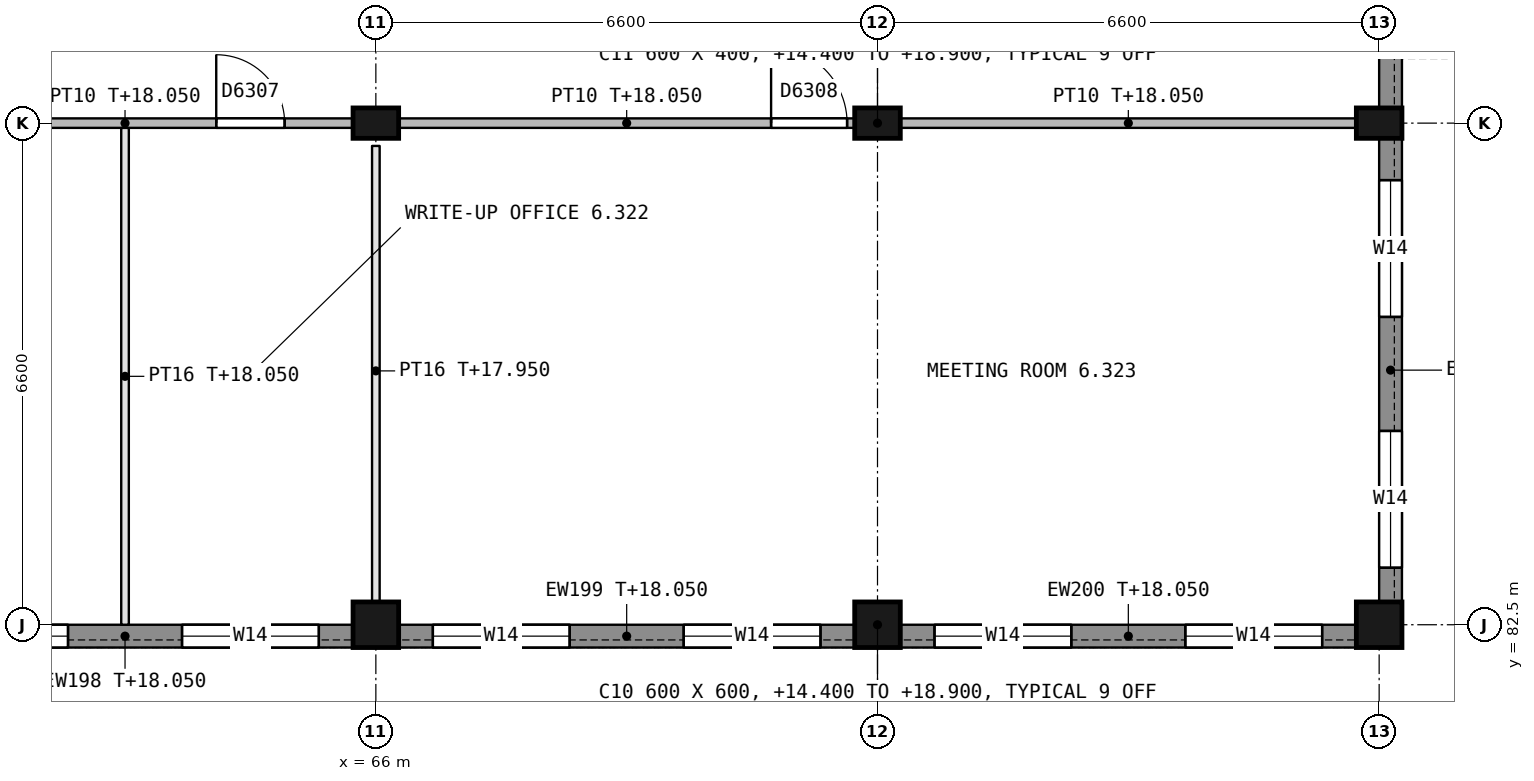
"""IFC4 building model, lengths in metres.
Left out: names, types, materials, properties, quantities, classifications, styles, units other than length and angle.
Written with IfcOpenShell. Run it as: python <this file> out.ifc"""

import sys

from ifc_helpers import new_model, si_unit, direction, frame, frame_2d, origin, origin_2d, place, context, subcontext, project, spatial, rectangle, extrude, element, fill, save


model = new_model("IFC4")
c1 = context("Model", 3, precision=1e-05, world=origin(), true_north=direction((0.0, 1.0)))
c2 = subcontext(c1, "Body", "Model", "MODEL_VIEW")
j1 = project(units=[si_unit("LENGTHUNIT", "METRE"), si_unit("PLANEANGLEUNIT", "RADIAN")], contexts=[c1])
p1 = place(None, origin())
s1 = spatial("IfcSite", under=j1, at=p1, CompositionType="ELEMENT")
p2 = place(p1, origin())
s2 = spatial("IfcBuilding", under=s1, at=p2, CompositionType="ELEMENT")
p3 = place(p2, frame((0.0, 0.0, 14.4)))
s3 = spatial("IfcBuildingStorey", under=s2, at=p3, CompositionType="ELEMENT", Elevation=14.4)
p4 = place(p3, frame((66.0, 82.5, 0.0), z_axis=(0.0, 0.0, 1.0), x_axis=(1.0, 0.0, 0.0)))
e1 = element("IfcColumn", 1, at=p4, inside=s3, PredefinedType="COLUMN", context=c2, shape_type="SweptSolid", body=[
    extrude(rectangle(XDim=0.6, YDim=0.6, at=origin_2d()), origin(), (0.0, 0.0, 1.0), 4.5),
])
p5 = place(p3, frame((66.0, 89.1, 0.0), z_axis=(0.0, 0.0, 1.0), x_axis=(1.0, 0.0, 0.0)))
e2 = element("IfcColumn", 2, at=p5, inside=s3, PredefinedType="COLUMN", context=c2, shape_type="SweptSolid", body=[
    extrude(rectangle(XDim=0.6, YDim=0.4, at=origin_2d()), origin(), (0.0, 0.0, 1.0), 4.5),
])
p6 = place(p3, frame((72.6, 82.5, 0.0), z_axis=(0.0, 0.0, 1.0), x_axis=(1.0, 0.0, 0.0)))
e3 = element("IfcColumn", 3, at=p6, inside=s3, PredefinedType="COLUMN", context=c2, shape_type="SweptSolid", body=[
    extrude(rectangle(XDim=0.6, YDim=0.6, at=origin_2d()), origin(), (0.0, 0.0, 1.0), 4.5),
])
p7 = place(p3, frame((72.6, 89.1, 0.0), z_axis=(0.0, 0.0, 1.0), x_axis=(1.0, 0.0, 0.0)))
e4 = element("IfcColumn", 4, at=p7, inside=s3, PredefinedType="COLUMN", context=c2, shape_type="SweptSolid", body=[
    extrude(rectangle(XDim=0.6, YDim=0.4, at=origin_2d()), origin(), (0.0, 0.0, 1.0), 4.5),
])
p8 = place(p3, frame((79.2, 82.5, 0.0), z_axis=(0.0, 0.0, 1.0), x_axis=(1.0, 0.0, 0.0)))
e5 = element("IfcColumn", 5, at=p8, inside=s3, PredefinedType="COLUMN", context=c2, shape_type="SweptSolid", body=[
    extrude(rectangle(XDim=0.6, YDim=0.6, at=origin_2d()), origin(), (0.0, 0.0, 1.0), 4.5),
])
p9 = place(p3, frame((79.2, 89.1, 0.0), z_axis=(0.0, 0.0, 1.0), x_axis=(1.0, 0.0, 0.0)))
e6 = element("IfcColumn", 6, at=p9, inside=s3, PredefinedType="COLUMN", context=c2, shape_type="SweptSolid", body=[
    extrude(rectangle(XDim=0.6, YDim=0.4, at=origin_2d()), origin(), (0.0, 0.0, 1.0), 4.5),
])
p10 = place(p3, frame((79.35, 88.9, 0.0), z_axis=(0.0, 0.0, 1.0), x_axis=(0.0, -1.0, 0.0)))
e7 = element("IfcWall", 7, at=p10, inside=s3, PredefinedType="STANDARD", context=c2, shape_type="SweptSolid", body=[
    extrude(rectangle(XDim=6.1, YDim=0.3, at=frame_2d((3.05, 0.0))), origin(), (0.0, 0.0, 1.0), 3.65),
])
p11 = place(p10, frame((3.85, 0.0, 0.9)))
e8 = element("IfcOpeningElement", 8, at=p11, cuts=e7, PredefinedType="OPENING", context=c2, shape_type="SweptSolid", body=[
    extrude(rectangle(XDim=1.8, YDim=1.5, at=frame_2d((0.9, 0.75))), frame((0.0, 0.16, 0.0), z_axis=(0.0, -1.0, 0.0), x_axis=(1.0, 0.0, 0.0)), (0.0, 0.0, 1.0), 0.32),
])
p12 = place(p10, frame((0.55, 0.0, 0.9)))
e9 = element("IfcOpeningElement", 9, at=p12, cuts=e7, PredefinedType="OPENING", context=c2, shape_type="SweptSolid", body=[
    extrude(rectangle(XDim=1.8, YDim=1.5, at=frame_2d((0.9, 0.75))), frame((0.0, 0.16, 0.0), z_axis=(0.0, -1.0, 0.0), x_axis=(1.0, 0.0, 0.0)), (0.0, 0.0, 1.0), 0.32),
])
p13 = place(p3, frame((79.35, 92.4, 0.0), z_axis=(0.0, 0.0, 1.0), x_axis=(0.0, -1.0, 0.0)))
e10 = element("IfcWall", 10, at=p13, inside=s3, PredefinedType="STANDARD", context=c2, shape_type="SweptSolid", body=[
    extrude(rectangle(XDim=3.1, YDim=0.3, at=frame_2d((1.55, 0.0))), origin(), (0.0, 0.0, 1.0), 3.65),
])
p14 = place(p13, frame((1.05, 0.0, 1.1)))
e11 = element("IfcOpeningElement", 11, at=p14, cuts=e10, PredefinedType="OPENING", context=c2, shape_type="SweptSolid", body=[
    extrude(rectangle(XDim=1.2, YDim=1.2, at=frame_2d((0.6, 0.6))), frame((0.0, 0.16, 0.0), z_axis=(0.0, -1.0, 0.0), x_axis=(1.0, 0.0, 0.0)), (0.0, 0.0, 1.0), 0.32),
])
p15 = place(p3, frame((65.7, 82.35, 0.0), z_axis=(0.0, 0.0, 1.0), x_axis=(-1.0, 0.0, 0.0)))
e12 = element("IfcWall", 12, at=p15, inside=s3, PredefinedType="STANDARD", context=c2, shape_type="SweptSolid", body=[
    extrude(rectangle(XDim=6.0, YDim=0.3, at=frame_2d((3.0, 0.0))), origin(), (0.0, 0.0, 1.0), 3.65),
])
p16 = place(p15, frame((3.75, 0.0, 0.9)))
e13 = element("IfcOpeningElement", 13, at=p16, cuts=e12, PredefinedType="OPENING", context=c2, shape_type="SweptSolid", body=[
    extrude(rectangle(XDim=1.8, YDim=1.5, at=frame_2d((0.9, 0.75))), frame((0.0, 0.16, 0.0), z_axis=(0.0, -1.0, 0.0), x_axis=(1.0, 0.0, 0.0)), (0.0, 0.0, 1.0), 0.32),
])
p17 = place(p15, frame((0.45, 0.0, 0.9)))
e14 = element("IfcOpeningElement", 14, at=p17, cuts=e12, PredefinedType="OPENING", context=c2, shape_type="SweptSolid", body=[
    extrude(rectangle(XDim=1.8, YDim=1.5, at=frame_2d((0.9, 0.75))), frame((0.0, 0.16, 0.0), z_axis=(0.0, -1.0, 0.0), x_axis=(1.0, 0.0, 0.0)), (0.0, 0.0, 1.0), 0.32),
])
p18 = place(p3, frame((72.3, 82.35, 0.0), z_axis=(0.0, 0.0, 1.0), x_axis=(-1.0, 0.0, 0.0)))
e15 = element("IfcWall", 15, at=p18, inside=s3, PredefinedType="STANDARD", context=c2, shape_type="SweptSolid", body=[
    extrude(rectangle(XDim=6.0, YDim=0.3, at=frame_2d((3.0, 0.0))), origin(), (0.0, 0.0, 1.0), 3.65),
])
p19 = place(p18, frame((3.75, 0.0, 0.9)))
e16 = element("IfcOpeningElement", 16, at=p19, cuts=e15, PredefinedType="OPENING", context=c2, shape_type="SweptSolid", body=[
    extrude(rectangle(XDim=1.8, YDim=1.5, at=frame_2d((0.9, 0.75))), frame((0.0, 0.16, 0.0), z_axis=(0.0, -1.0, 0.0), x_axis=(1.0, 0.0, 0.0)), (0.0, 0.0, 1.0), 0.32),
])
p20 = place(p18, frame((0.45, 0.0, 0.9)))
e17 = element("IfcOpeningElement", 17, at=p20, cuts=e15, PredefinedType="OPENING", context=c2, shape_type="SweptSolid", body=[
    extrude(rectangle(XDim=1.8, YDim=1.5, at=frame_2d((0.9, 0.75))), frame((0.0, 0.16, 0.0), z_axis=(0.0, -1.0, 0.0), x_axis=(1.0, 0.0, 0.0)), (0.0, 0.0, 1.0), 0.32),
])
p21 = place(p3, frame((78.9, 82.35, 0.0), z_axis=(0.0, 0.0, 1.0), x_axis=(-1.0, 0.0, 0.0)))
e18 = element("IfcWall", 18, at=p21, inside=s3, PredefinedType="STANDARD", context=c2, shape_type="SweptSolid", body=[
    extrude(rectangle(XDim=6.0, YDim=0.3, at=frame_2d((3.0, 0.0))), origin(), (0.0, 0.0, 1.0), 3.65),
])
p22 = place(p21, frame((3.75, 0.0, 0.9)))
e19 = element("IfcOpeningElement", 19, at=p22, cuts=e18, PredefinedType="OPENING", context=c2, shape_type="SweptSolid", body=[
    extrude(rectangle(XDim=1.8, YDim=1.5, at=frame_2d((0.9, 0.75))), frame((0.0, 0.16, 0.0), z_axis=(0.0, -1.0, 0.0), x_axis=(1.0, 0.0, 0.0)), (0.0, 0.0, 1.0), 0.32),
])
p23 = place(p21, frame((0.45, 0.0, 0.9)))
e20 = element("IfcOpeningElement", 20, at=p23, cuts=e18, PredefinedType="OPENING", context=c2, shape_type="SweptSolid", body=[
    extrude(rectangle(XDim=1.8, YDim=1.5, at=frame_2d((0.9, 0.75))), frame((0.0, 0.16, 0.0), z_axis=(0.0, -1.0, 0.0), x_axis=(1.0, 0.0, 0.0)), (0.0, 0.0, 1.0), 0.32),
])
p24 = place(p3, frame((65.7, 89.1, 0.0), z_axis=(0.0, 0.0, 1.0), x_axis=(-1.0, 0.0, 0.0)))
e21 = element("IfcWall", 21, at=p24, inside=s3, PredefinedType="PARTITIONING", context=c2, shape_type="SweptSolid", body=[
    extrude(rectangle(XDim=6.0, YDim=0.125, at=frame_2d((3.0, 0.0))), origin(), (0.0, 0.0, 1.0), 3.65),
])
p25 = place(p24, frame((4.2, 0.0, 0.0)))
e22 = element("IfcOpeningElement", 22, at=p25, cuts=e21, PredefinedType="OPENING", context=c2, shape_type="SweptSolid", body=[
    extrude(rectangle(XDim=0.9, YDim=2.1, at=frame_2d((0.45, 1.05))), frame((0.0, 0.073, 0.0), z_axis=(0.0, -1.0, 0.0), x_axis=(1.0, 0.0, 0.0)), (0.0, 0.0, 1.0), 0.145),
])
p26 = place(p24, frame((0.9, 0.0, 0.0)))
e23 = element("IfcOpeningElement", 23, at=p26, cuts=e21, PredefinedType="OPENING", context=c2, shape_type="SweptSolid", body=[
    extrude(rectangle(XDim=0.9, YDim=2.1, at=frame_2d((0.45, 1.05))), frame((0.0, 0.073, 0.0), z_axis=(0.0, -1.0, 0.0), x_axis=(1.0, 0.0, 0.0)), (0.0, 0.0, 1.0), 0.145),
])
p27 = place(p3, frame((72.3, 89.1, 0.0), z_axis=(0.0, 0.0, 1.0), x_axis=(-1.0, 0.0, 0.0)))
e24 = element("IfcWall", 24, at=p27, inside=s3, PredefinedType="PARTITIONING", context=c2, shape_type="SweptSolid", body=[
    extrude(rectangle(XDim=6.0, YDim=0.125, at=frame_2d((3.0, 0.0))), origin(), (0.0, 0.0, 1.0), 3.65),
])
p28 = place(p27, frame((0.1, 0.0, 0.0)))
e25 = element("IfcOpeningElement", 25, at=p28, cuts=e24, PredefinedType="OPENING", context=c2, shape_type="SweptSolid", body=[
    extrude(rectangle(XDim=1.0, YDim=2.1, at=frame_2d((0.5, 1.05))), frame((0.0, 0.073, 0.0), z_axis=(0.0, -1.0, 0.0), x_axis=(1.0, 0.0, 0.0)), (0.0, 0.0, 1.0), 0.145),
])
p29 = place(p3, frame((72.9, 89.1, 0.0), z_axis=(0.0, 0.0, 1.0), x_axis=(1.0, 0.0, 0.0)))
e26 = element("IfcWall", 26, at=p29, inside=s3, PredefinedType="PARTITIONING", context=c2, shape_type="SweptSolid", body=[
    extrude(rectangle(XDim=6.0, YDim=0.125, at=frame_2d((3.0, 0.0))), origin(), (0.0, 0.0, 1.0), 3.65),
])
p30 = place(p3, frame((62.7, 82.5, 0.0), z_axis=(0.0, 0.0, 1.0), x_axis=(0.0, 1.0, 0.0)))
e27 = element("IfcWall", 27, at=p30, inside=s3, PredefinedType="PARTITIONING", context=c2, shape_type="SweptSolid", body=[
    extrude(rectangle(XDim=6.537, YDim=0.1, at=frame_2d((3.269, 0.0))), origin(), (0.0, 0.0, 1.0), 3.65),
])
p31 = place(p3, frame((66.0, 82.8, 0.0), z_axis=(0.0, 0.0, 1.0), x_axis=(0.0, 1.0, 0.0)))
e28 = element("IfcWall", 28, at=p31, inside=s3, PredefinedType="PARTITIONING", context=c2, shape_type="SweptSolid", body=[
    extrude(rectangle(XDim=6.0, YDim=0.1, at=frame_2d((3.0, 0.0))), origin(), (0.0, 0.0, 1.0), 3.55),
])
p32 = place(p11, origin())
e29 = element("IfcWindow", 29, at=p32, inside=s3, PartitioningType="SINGLE_PANEL", PredefinedType="WINDOW", context=c2, shape_type="SweptSolid", body=[
    extrude(rectangle(XDim=1.8, YDim=1.5, at=frame_2d((0.9, 0.75))), frame((0.0, 0.03, 0.0), z_axis=(0.0, -1.0, 0.0), x_axis=(1.0, 0.0, 0.0)), (0.0, 0.0, 1.0), 0.06),
])
fill(e8, e29)
p33 = place(p12, origin())
e30 = element("IfcWindow", 30, at=p33, inside=s3, PartitioningType="SINGLE_PANEL", PredefinedType="WINDOW", context=c2, shape_type="SweptSolid", body=[
    extrude(rectangle(XDim=1.8, YDim=1.5, at=frame_2d((0.9, 0.75))), frame((0.0, 0.03, 0.0), z_axis=(0.0, -1.0, 0.0), x_axis=(1.0, 0.0, 0.0)), (0.0, 0.0, 1.0), 0.06),
])
fill(e9, e30)
p34 = place(p16, origin())
e31 = element("IfcWindow", 31, at=p34, inside=s3, PartitioningType="SINGLE_PANEL", PredefinedType="WINDOW", context=c2, shape_type="SweptSolid", body=[
    extrude(rectangle(XDim=1.8, YDim=1.5, at=frame_2d((0.9, 0.75))), frame((0.0, 0.03, 0.0), z_axis=(0.0, -1.0, 0.0), x_axis=(1.0, 0.0, 0.0)), (0.0, 0.0, 1.0), 0.06),
])
fill(e13, e31)
p35 = place(p17, origin())
e32 = element("IfcWindow", 32, at=p35, inside=s3, PartitioningType="SINGLE_PANEL", PredefinedType="WINDOW", context=c2, shape_type="SweptSolid", body=[
    extrude(rectangle(XDim=1.8, YDim=1.5, at=frame_2d((0.9, 0.75))), frame((0.0, 0.03, 0.0), z_axis=(0.0, -1.0, 0.0), x_axis=(1.0, 0.0, 0.0)), (0.0, 0.0, 1.0), 0.06),
])
fill(e14, e32)
p36 = place(p19, origin())
e33 = element("IfcWindow", 33, at=p36, inside=s3, PartitioningType="SINGLE_PANEL", PredefinedType="WINDOW", context=c2, shape_type="SweptSolid", body=[
    extrude(rectangle(XDim=1.8, YDim=1.5, at=frame_2d((0.9, 0.75))), frame((0.0, 0.03, 0.0), z_axis=(0.0, -1.0, 0.0), x_axis=(1.0, 0.0, 0.0)), (0.0, 0.0, 1.0), 0.06),
])
fill(e16, e33)
p37 = place(p20, origin())
e34 = element("IfcWindow", 34, at=p37, inside=s3, PartitioningType="SINGLE_PANEL", PredefinedType="WINDOW", context=c2, shape_type="SweptSolid", body=[
    extrude(rectangle(XDim=1.8, YDim=1.5, at=frame_2d((0.9, 0.75))), frame((0.0, 0.03, 0.0), z_axis=(0.0, -1.0, 0.0), x_axis=(1.0, 0.0, 0.0)), (0.0, 0.0, 1.0), 0.06),
])
fill(e17, e34)
p38 = place(p22, origin())
e35 = element("IfcWindow", 35, at=p38, inside=s3, PartitioningType="SINGLE_PANEL", PredefinedType="WINDOW", context=c2, shape_type="SweptSolid", body=[
    extrude(rectangle(XDim=1.8, YDim=1.5, at=frame_2d((0.9, 0.75))), frame((0.0, 0.03, 0.0), z_axis=(0.0, -1.0, 0.0), x_axis=(1.0, 0.0, 0.0)), (0.0, 0.0, 1.0), 0.06),
])
fill(e19, e35)
p39 = place(p23, origin())
e36 = element("IfcWindow", 36, at=p39, inside=s3, PartitioningType="SINGLE_PANEL", PredefinedType="WINDOW", context=c2, shape_type="SweptSolid", body=[
    extrude(rectangle(XDim=1.8, YDim=1.5, at=frame_2d((0.9, 0.75))), frame((0.0, 0.03, 0.0), z_axis=(0.0, -1.0, 0.0), x_axis=(1.0, 0.0, 0.0)), (0.0, 0.0, 1.0), 0.06),
])
fill(e20, e36)
p40 = place(p26, origin())
e37 = element("IfcDoor", 37, at=p40, inside=s3, OperationType="SINGLE_SWING_RIGHT", PredefinedType="DOOR", context=c2, shape_type="SweptSolid", body=[
    extrude(rectangle(XDim=0.9, YDim=2.1, at=frame_2d((0.45, 1.05))), frame((0.0, 0.025, 0.0), z_axis=(0.0, -1.0, 0.0), x_axis=(1.0, 0.0, 0.0)), (0.0, 0.0, 1.0), 0.05),
])
fill(e23, e37)
p41 = place(p28, origin())
e38 = element("IfcDoor", 38, at=p41, inside=s3, OperationType="SINGLE_SWING_RIGHT", PredefinedType="DOOR", context=c2, shape_type="SweptSolid", body=[
    extrude(rectangle(XDim=1.0, YDim=2.1, at=frame_2d((0.5, 1.05))), frame((0.0, 0.025, 0.0), z_axis=(0.0, -1.0, 0.0), x_axis=(1.0, 0.0, 0.0)), (0.0, 0.0, 1.0), 0.05),
])
fill(e25, e38)
save(model, sys.argv[1])
